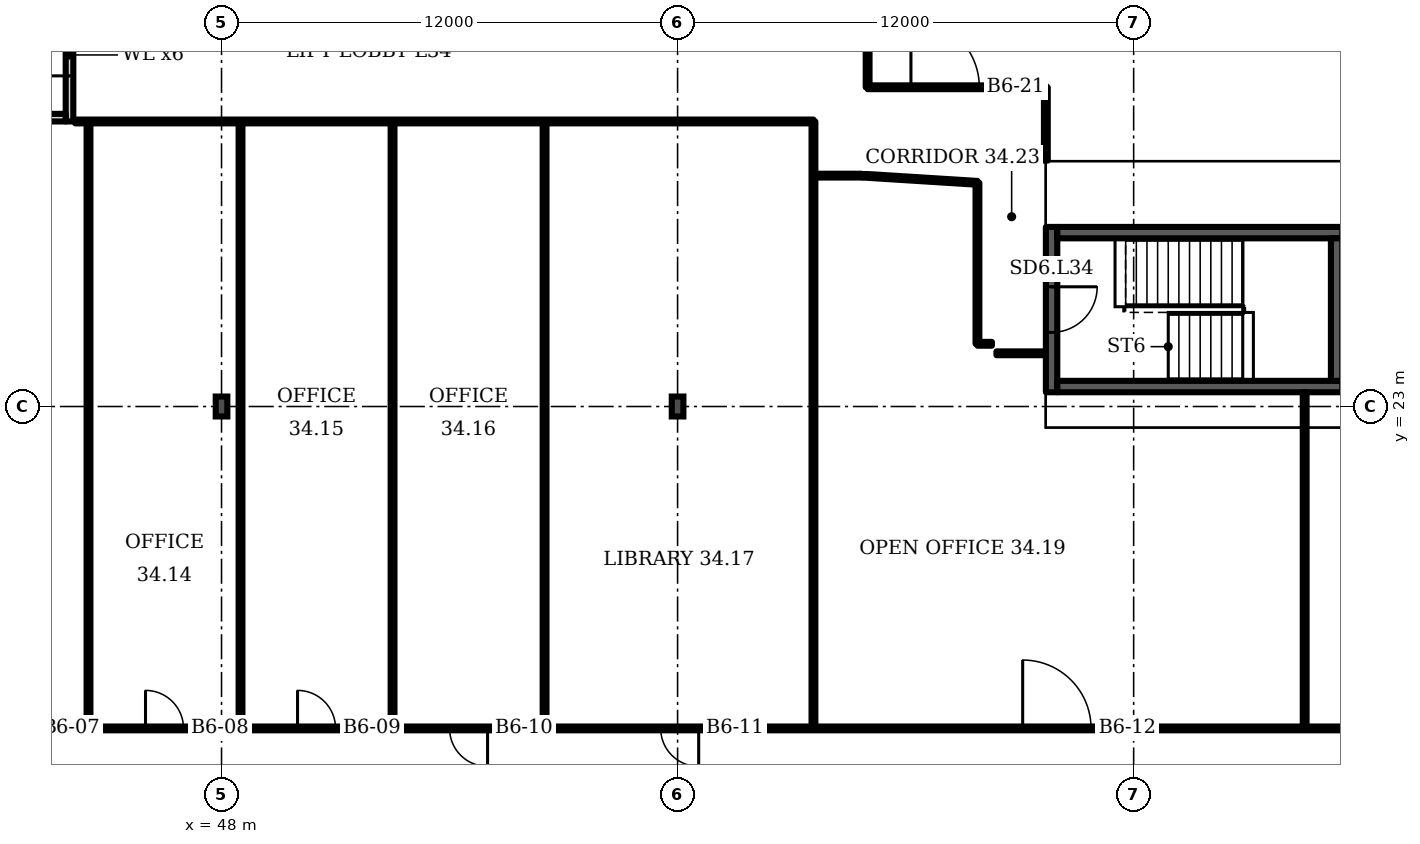
"""IFC4 building model, lengths in metres.
Left out: names, types, materials, properties, quantities, classifications, styles, units other than length and angle.
Written with IfcOpenShell. Run it as: python <this file> out.ifc"""

import sys

from ifc_helpers import new_model, si_unit, direction, frame, frame_2d, origin, origin_2d, place, context, subcontext, project, spatial, rectangle, i_section, extrude, element, fill, save


model = new_model("IFC4")
c1 = context("Model", 3, precision=1e-05, world=origin(), true_north=direction((0.0, 1.0)))
c2 = subcontext(c1, "Body", "Model", "MODEL_VIEW")
j1 = project(units=[si_unit("LENGTHUNIT", "METRE"), si_unit("PLANEANGLEUNIT", "RADIAN")], contexts=[c1])
p1 = place(None, origin())
s1 = spatial("IfcSite", under=j1, at=p1, CompositionType="ELEMENT")
p2 = place(p1, origin())
s2 = spatial("IfcBuilding", under=s1, at=p2, CompositionType="ELEMENT")
p3 = place(p2, frame((0.0, 0.0, 143.5)))
s3 = spatial("IfcBuildingStorey", under=s2, at=p3, CompositionType="ELEMENT", Elevation=143.5)
for number, where, z_axis, x_axis in (
    (1, (48.0, 23.0, 0.0), (0.0, 0.0, 1.0), (1.0, 0.0, 0.0)),
    (2, (60.0, 23.0, 0.0), (0.0, 0.0, 1.0), (1.0, 0.0, 0.0)),
):
    element("IfcColumn", number, at=place(p3, frame(where, z_axis=z_axis, x_axis=x_axis)), inside=s3, PredefinedType="COLUMN", context=c2, shape_type="SweptSolid", body=[
        extrude(i_section(OverallWidth=0.306, OverallDepth=0.524, WebThickness=0.021, FlangeThickness=0.04, FilletRadius=0.027, at=origin_2d()), origin(), (0.0, 0.0, 1.0), 3.6),
    ])
p4 = place(p3, frame((44.0, 30.5, 0.0), z_axis=(0.0, 0.0, 1.0), x_axis=(0.0, 1.0, 0.0)))
e3 = element("IfcWall", 3, at=p4, inside=s3, PredefinedType="PARTITIONING", context=c2, shape_type="SweptSolid", body=[
    extrude(rectangle(XDim=3.5, YDim=0.2, at=frame_2d((1.75, 0.0))), origin(), (0.0, 0.0, 1.0), 3.15),
])
p5 = place(p4, frame((1.2, 0.0, 0.0)))
e4 = element("IfcOpeningElement", 4, at=p5, cuts=e3, PredefinedType="OPENING", context=c2, shape_type="SweptSolid", body=[
    extrude(rectangle(XDim=1.1, YDim=2.1, at=frame_2d((0.55, 1.05))), frame((0.0, 0.11, 0.0), z_axis=(0.0, -1.0, 0.0), x_axis=(1.0, 0.0, 0.0)), (0.0, 0.0, 1.0), 0.22),
])
p6 = place(p3, frame((41.1, 30.6, 0.0), z_axis=(0.0, 0.0, 1.0), x_axis=(1.0, 0.0, 0.0)))
e5 = element("IfcWall", 5, at=p6, inside=s3, PredefinedType="PARTITIONING", context=c2, shape_type="SweptSolid", body=[
    extrude(rectangle(XDim=2.8, YDim=0.2, at=frame_2d((1.4, 0.0))), origin(), (0.0, 0.0, 1.0), 3.15),
])
p7 = place(p3, frame((69.84, 23.375, 0.0), z_axis=(0.0, 0.0, 1.0), x_axis=(0.0, 1.0, 0.0)))
e6 = element("IfcWall", 6, at=p7, inside=s3, PredefinedType="SHEAR", context=c2, shape_type="SweptSolid", body=[
    extrude(rectangle(XDim=4.35, YDim=0.3, at=frame_2d((2.175, 0.0))), origin(), (0.0, 0.0, 1.0), 3.15),
])
p8 = place(p7, frame((1.575, 0.0, 0.0)))
e7 = element("IfcOpeningElement", 7, at=p8, cuts=e6, PredefinedType="OPENING", context=c2, shape_type="SweptSolid", body=[
    extrude(rectangle(XDim=1.2, YDim=2.1, at=frame_2d((0.6, 1.05))), frame((0.0, 0.16, 0.0), z_axis=(0.0, -1.0, 0.0), x_axis=(1.0, 0.0, 0.0)), (0.0, 0.0, 1.0), 0.32),
])
p9 = place(p3, frame((18.2, 14.53, 0.0), z_axis=(0.0, 0.0, 1.0), x_axis=(1.0, 0.0, 0.0)))
e8 = element("IfcWall", 8, at=p9, inside=s3, PredefinedType="PARTITIONING", context=c2, shape_type="SweptSolid", body=[
    extrude(rectangle(XDim=68.41, YDim=0.1, at=frame_2d((34.205, 0.0))), origin(), (0.0, 0.0, 1.0), 3.15),
])
p10 = place(p9, frame((4.605, 0.0, 0.0)))
e9 = element("IfcOpeningElement", 9, at=p10, cuts=e8, PredefinedType="OPENING", context=c2, shape_type="SweptSolid", body=[
    extrude(rectangle(XDim=1.0, YDim=2.1, at=frame_2d((0.5, 1.05))), frame((0.0, 0.06, 0.0), z_axis=(0.0, -1.0, 0.0), x_axis=(1.0, 0.0, 0.0)), (0.0, 0.0, 1.0), 0.12),
])
p11 = place(p9, frame((23.88, 0.0, 0.0)))
e10 = element("IfcOpeningElement", 10, at=p11, cuts=e8, PredefinedType="OPENING", context=c2, shape_type="SweptSolid", body=[
    extrude(rectangle(XDim=1.0, YDim=2.1, at=frame_2d((0.5, 1.05))), frame((0.0, 0.06, 0.0), z_axis=(0.0, -1.0, 0.0), x_axis=(1.0, 0.0, 0.0)), (0.0, 0.0, 1.0), 0.12),
])
p12 = place(p9, frame((27.8, 0.0, 0.0)))
e11 = element("IfcOpeningElement", 11, at=p12, cuts=e8, PredefinedType="OPENING", context=c2, shape_type="SweptSolid", body=[
    extrude(rectangle(XDim=1.0, YDim=2.1, at=frame_2d((0.5, 1.05))), frame((0.0, 0.06, 0.0), z_axis=(0.0, -1.0, 0.0), x_axis=(1.0, 0.0, 0.0)), (0.0, 0.0, 1.0), 0.12),
])
p13 = place(p9, frame((31.8, 0.0, 0.0)))
e12 = element("IfcOpeningElement", 12, at=p13, cuts=e8, PredefinedType="OPENING", context=c2, shape_type="SweptSolid", body=[
    extrude(rectangle(XDim=1.0, YDim=2.1, at=frame_2d((0.5, 1.05))), frame((0.0, 0.06, 0.0), z_axis=(0.0, -1.0, 0.0), x_axis=(1.0, 0.0, 0.0)), (0.0, 0.0, 1.0), 0.12),
])
p14 = place(p9, frame((35.8, 0.0, 0.0)))
e13 = element("IfcOpeningElement", 13, at=p14, cuts=e8, PredefinedType="OPENING", context=c2, shape_type="SweptSolid", body=[
    extrude(rectangle(XDim=1.0, YDim=2.1, at=frame_2d((0.5, 1.05))), frame((0.0, 0.06, 0.0), z_axis=(0.0, -1.0, 0.0), x_axis=(1.0, 0.0, 0.0)), (0.0, 0.0, 1.0), 0.12),
])
p15 = place(p9, frame((41.355, 0.0, 0.0)))
e14 = element("IfcOpeningElement", 14, at=p15, cuts=e8, PredefinedType="OPENING", context=c2, shape_type="SweptSolid", body=[
    extrude(rectangle(XDim=1.0, YDim=2.1, at=frame_2d((0.5, 1.05))), frame((0.0, 0.06, 0.0), z_axis=(0.0, -1.0, 0.0), x_axis=(1.0, 0.0, 0.0)), (0.0, 0.0, 1.0), 0.12),
])
p16 = place(p9, frame((50.88, 0.0, 0.0)))
e15 = element("IfcOpeningElement", 15, at=p16, cuts=e8, PredefinedType="OPENING", context=c2, shape_type="SweptSolid", body=[
    extrude(rectangle(XDim=1.8, YDim=2.1, at=frame_2d((0.9, 1.05))), frame((0.0, 0.06, 0.0), z_axis=(0.0, -1.0, 0.0), x_axis=(1.0, 0.0, 0.0)), (0.0, 0.0, 1.0), 0.12),
])
p17 = place(p9, frame((62.796, 0.0, 0.0)))
e16 = element("IfcOpeningElement", 16, at=p17, cuts=e8, PredefinedType="OPENING", context=c2, shape_type="SweptSolid", body=[
    extrude(rectangle(XDim=1.0, YDim=2.1, at=frame_2d((0.5, 1.05))), frame((0.0, 0.06, 0.0), z_axis=(0.0, -1.0, 0.0), x_axis=(1.0, 0.0, 0.0)), (0.0, 0.0, 1.0), 0.12),
])
for number, where, z_axis, x_axis in (
    (17, (44.5, 14.53, 0.0), (0.0, 0.0, 1.0), (0.0, 1.0, 0.0)),
    (18, (48.5, 14.53, 0.0), (0.0, 0.0, 1.0), (0.0, 1.0, 0.0)),
    (19, (52.5, 14.53, 0.0), (0.0, 0.0, 1.0), (0.0, 1.0, 0.0)),
    (20, (56.5, 14.53, 0.0), (0.0, 0.0, 1.0), (0.0, 1.0, 0.0)),
    (21, (63.575, 14.53, 0.0), (0.0, 0.0, 1.0), (0.0, 1.0, 0.0)),
):
    element("IfcWall", number, at=place(p3, frame(where, z_axis=z_axis, x_axis=x_axis)), inside=s3, PredefinedType="PARTITIONING", context=c2, shape_type="SweptSolid", body=[
        extrude(rectangle(XDim=15.97, YDim=0.1, at=frame_2d((7.985, 0.0))), origin(), (0.0, 0.0, 1.0), 3.15),
    ])
p18 = place(p3, frame((63.575, 29.075, 0.0), z_axis=(0.0, 0.0, 1.0), x_axis=(1.0, 0.0, 0.0)))
e22 = element("IfcWall", 22, at=p18, inside=s3, PredefinedType="PARTITIONING", context=c2, shape_type="SweptSolid", body=[
    extrude(rectangle(XDim=1.285, YDim=0.1, at=frame_2d((0.643, 0.0))), origin(), (0.0, 0.0, 1.0), 3.15),
])
p19 = place(p3, frame((65.0, 31.4, 0.0), z_axis=(0.0, 0.0, 1.0), x_axis=(0.0, 1.0, 0.0)))
e23 = element("IfcWall", 23, at=p19, inside=s3, PredefinedType="PARTITIONING", context=c2, shape_type="SweptSolid", body=[
    extrude(rectangle(XDim=2.58, YDim=0.1, at=frame_2d((1.29, 0.0))), origin(), (0.0, 0.0, 1.0), 3.15),
])
p20 = place(p3, frame((65.0, 31.4, 0.0), z_axis=(0.0, 0.0, 1.0), x_axis=(1.0, 0.0, 0.0)))
e24 = element("IfcWall", 24, at=p20, inside=s3, PredefinedType="PARTITIONING", context=c2, shape_type="SweptSolid", body=[
    extrude(rectangle(XDim=4.69, YDim=0.1, at=frame_2d((2.345, 0.0))), origin(), (0.0, 0.0, 1.0), 3.15),
])
p21 = place(p20, frame((1.14, 0.0, 0.0)))
e25 = element("IfcOpeningElement", 25, at=p21, cuts=e24, PredefinedType="OPENING", context=c2, shape_type="SweptSolid", body=[
    extrude(rectangle(XDim=1.8, YDim=2.1, at=frame_2d((0.9, 1.05))), frame((0.0, 0.06, 0.0), z_axis=(0.0, -1.0, 0.0), x_axis=(1.0, 0.0, 0.0)), (0.0, 0.0, 1.0), 0.12),
])
p22 = place(p3, frame((67.89, 24.65, 0.0), z_axis=(0.0, 0.0, 1.0), x_axis=(0.0, 1.0, 0.0)))
e26 = element("IfcWall", 26, at=p22, inside=s3, PredefinedType="PARTITIONING", context=c2, shape_type="SweptSolid", body=[
    extrude(rectangle(XDim=4.235, YDim=0.1, at=frame_2d((2.118, 0.0))), origin(), (0.0, 0.0, 1.0), 3.15),
])
p23 = place(p3, frame((67.89, 24.65, 0.0), z_axis=(0.0, 0.0, 1.0), x_axis=(1.0, 0.0, 0.0)))
e27 = element("IfcWall", 27, at=p23, inside=s3, PredefinedType="PARTITIONING", context=c2, shape_type="SweptSolid", body=[
    extrude(rectangle(XDim=0.38, YDim=0.1, at=frame_2d((0.19, 0.0))), origin(), (0.0, 0.0, 1.0), 3.15),
])
p24 = place(p3, frame((67.89, 28.885, 0.0), z_axis=(0.0, 0.0, 1.0), x_axis=(-0.998031, 0.062786, 0.0)))
e28 = element("IfcWall", 28, at=p24, inside=s3, PredefinedType="PARTITIONING", context=c2, shape_type="SweptSolid", body=[
    extrude(rectangle(XDim=3.021, YDim=0.1, at=frame_2d((1.511, 0.0))), origin(), (0.0, 0.0, 1.0), 3.15),
])
p25 = place(p3, frame((68.39, 24.4, 0.0), z_axis=(0.0, 0.0, 1.0), x_axis=(1.0, 0.0, 0.0)))
e29 = element("IfcWall", 29, at=p25, inside=s3, PredefinedType="PARTITIONING", context=c2, shape_type="SweptSolid", body=[
    extrude(rectangle(XDim=1.281, YDim=0.1, at=frame_2d((0.64, 0.0))), origin(), (0.0, 0.0, 1.0), 3.15),
])
p26 = place(p3, frame((69.69, 29.47, 0.0), z_axis=(0.0, 0.0, 1.0), x_axis=(0.0, 1.0, 0.0)))
e30 = element("IfcWall", 30, at=p26, inside=s3, PredefinedType="PARTITIONING", context=c2, shape_type="SweptSolid", body=[
    extrude(rectangle(XDim=1.93, YDim=0.1, at=frame_2d((0.965, 0.0))), origin(), (0.0, 0.0, 1.0), 3.15),
])
p27 = place(p3, frame((76.5, 14.53, 0.0), z_axis=(0.0, 0.0, 1.0), x_axis=(0.0, 1.0, 0.0)))
e31 = element("IfcWall", 31, at=p27, inside=s3, PredefinedType="PARTITIONING", context=c2, shape_type="SweptSolid", body=[
    extrude(rectangle(XDim=8.845, YDim=0.1, at=frame_2d((4.422, 0.0))), origin(), (0.0, 0.0, 1.0), 3.15),
])
p28 = place(p3, frame((44.15, 30.5, 0.0), z_axis=(0.0, 0.0, 1.0), x_axis=(1.0, 0.0, 0.0)))
e32 = element("IfcWall", 32, at=p28, inside=s3, PredefinedType="PARTITIONING", context=c2, shape_type="SweptSolid", body=[
    extrude(rectangle(XDim=19.425, YDim=0.1, at=frame_2d((9.712, 0.0))), origin(), (0.0, 0.0, 1.0), 3.15),
])
for number, where, z_axis, x_axis in (
    (33, (69.99, 23.525, 0.0), (0.0, 0.0, 1.0), (1.0, 0.0, 0.0)),
    (34, (69.99, 27.575, 0.0), (0.0, 0.0, 1.0), (1.0, 0.0, 0.0)),
):
    element("IfcWall", number, at=place(p3, frame(where, z_axis=z_axis, x_axis=x_axis)), inside=s3, PredefinedType="SHEAR", context=c2, shape_type="SweptSolid", body=[
        extrude(rectangle(XDim=7.5, YDim=0.3, at=frame_2d((3.75, 0.0))), origin(), (0.0, 0.0, 1.0), 3.15),
    ])
p29 = place(p3, frame((77.34, 23.675, 0.0), z_axis=(0.0, 0.0, 1.0), x_axis=(0.0, 1.0, 0.0)))
e35 = element("IfcWall", 35, at=p29, inside=s3, PredefinedType="SHEAR", context=c2, shape_type="SweptSolid", body=[
    extrude(rectangle(XDim=3.75, YDim=0.3, at=frame_2d((1.875, 0.0))), origin(), (0.0, 0.0, 1.0), 3.15),
])
p30 = place(p5, origin())
e36 = element("IfcDoor", 36, at=p30, inside=s3, OperationType="SINGLE_SWING_LEFT", PredefinedType="DOOR", context=c2, shape_type="SweptSolid", body=[
    extrude(rectangle(XDim=1.1, YDim=2.1, at=frame_2d((0.55, 1.05))), frame((0.0, 0.025, 0.0), z_axis=(0.0, -1.0, 0.0), x_axis=(1.0, 0.0, 0.0)), (0.0, 0.0, 1.0), 0.05),
])
fill(e4, e36)
p31 = place(p8, origin())
e37 = element("IfcDoor", 37, at=p31, inside=s3, OperationType="SINGLE_SWING_RIGHT", PredefinedType="DOOR", context=c2, shape_type="SweptSolid", body=[
    extrude(rectangle(XDim=1.2, YDim=2.1, at=frame_2d((0.6, 1.05))), frame((0.0, 0.025, 0.0), z_axis=(0.0, -1.0, 0.0), x_axis=(1.0, 0.0, 0.0)), (0.0, 0.0, 1.0), 0.05),
])
fill(e7, e37)
p32 = place(p12, origin())
e38 = element("IfcDoor", 38, at=p32, inside=s3, OperationType="SINGLE_SWING_LEFT", PredefinedType="DOOR", context=c2, shape_type="SweptSolid", body=[
    extrude(rectangle(XDim=1.0, YDim=2.1, at=frame_2d((0.5, 1.05))), frame((0.0, 0.025, 0.0), z_axis=(0.0, -1.0, 0.0), x_axis=(1.0, 0.0, 0.0)), (0.0, 0.0, 1.0), 0.05),
])
fill(e11, e38)
p33 = place(p13, origin())
e39 = element("IfcDoor", 39, at=p33, inside=s3, OperationType="SINGLE_SWING_LEFT", PredefinedType="DOOR", context=c2, shape_type="SweptSolid", body=[
    extrude(rectangle(XDim=1.0, YDim=2.1, at=frame_2d((0.5, 1.05))), frame((0.0, 0.025, 0.0), z_axis=(0.0, -1.0, 0.0), x_axis=(1.0, 0.0, 0.0)), (0.0, 0.0, 1.0), 0.05),
])
fill(e12, e39)
p34 = place(p14, origin())
e40 = element("IfcDoor", 40, at=p34, inside=s3, OperationType="SINGLE_SWING_RIGHT", PredefinedType="DOOR", context=c2, shape_type="SweptSolid", body=[
    extrude(rectangle(XDim=1.0, YDim=2.1, at=frame_2d((0.5, 1.05))), frame((0.0, 0.025, 0.0), z_axis=(0.0, -1.0, 0.0), x_axis=(1.0, 0.0, 0.0)), (0.0, 0.0, 1.0), 0.05),
])
fill(e13, e40)
p35 = place(p15, origin())
e41 = element("IfcDoor", 41, at=p35, inside=s3, OperationType="SINGLE_SWING_RIGHT", PredefinedType="DOOR", context=c2, shape_type="SweptSolid", body=[
    extrude(rectangle(XDim=1.0, YDim=2.1, at=frame_2d((0.5, 1.05))), frame((0.0, 0.025, 0.0), z_axis=(0.0, -1.0, 0.0), x_axis=(1.0, 0.0, 0.0)), (0.0, 0.0, 1.0), 0.05),
])
fill(e14, e41)
p36 = place(p16, origin())
e42 = element("IfcDoor", 42, at=p36, inside=s3, OperationType="DOUBLE_DOOR_SINGLE_SWING", PredefinedType="DOOR", context=c2, shape_type="SweptSolid", body=[
    extrude(rectangle(XDim=1.8, YDim=2.1, at=frame_2d((0.9, 1.05))), frame((0.0, 0.025, 0.0), z_axis=(0.0, -1.0, 0.0), x_axis=(1.0, 0.0, 0.0)), (0.0, 0.0, 1.0), 0.05),
])
fill(e15, e42)
p37 = place(p21, origin())
e43 = element("IfcDoor", 43, at=p37, inside=s3, OperationType="DOUBLE_DOOR_SINGLE_SWING", PredefinedType="DOOR", context=c2, shape_type="SweptSolid", body=[
    extrude(rectangle(XDim=1.8, YDim=2.1, at=frame_2d((0.9, 1.05))), frame((0.0, 0.025, 0.0), z_axis=(0.0, -1.0, 0.0), x_axis=(1.0, 0.0, 0.0)), (0.0, 0.0, 1.0), 0.05),
])
fill(e25, e43)
save(model, sys.argv[1])
